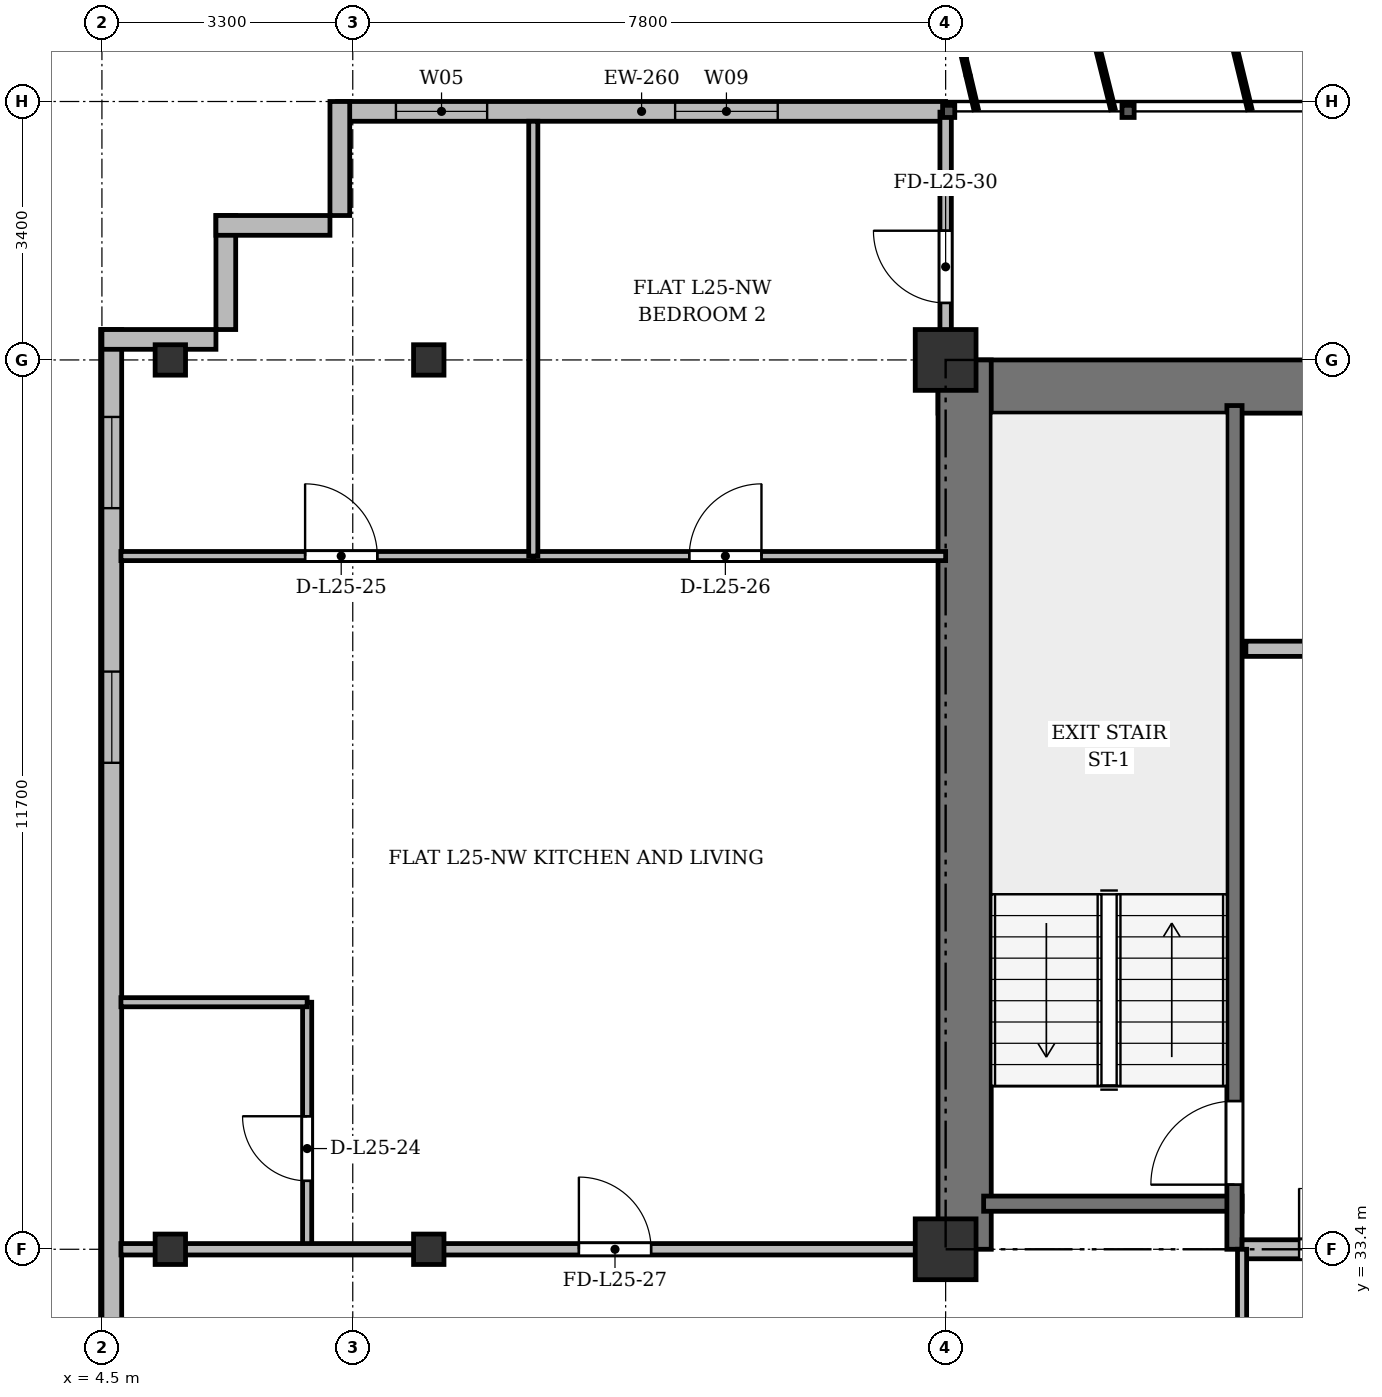
"""IFC4 building model, lengths in metres.
Left out: names, types, materials, properties, quantities, classifications, styles, units other than length and angle.
Written with IfcOpenShell. Run it as: python <this file> out.ifc"""

import sys

from ifc_helpers import new_model, si_unit, direction, frame, frame_2d, origin, origin_2d, place, context, subcontext, project, spatial, rectangle, i_section, extrude, source, transform, mapped, element, fill, save


model = new_model("IFC4")
c1 = context("Model", 3, precision=1e-05, world=origin(), true_north=direction((0.0, 1.0)))
c2 = subcontext(c1, "Body", "Model", "MODEL_VIEW")
j1 = project(units=[si_unit("LENGTHUNIT", "METRE"), si_unit("PLANEANGLEUNIT", "RADIAN")], contexts=[c1])
p1 = place(None, origin())
s1 = spatial("IfcSite", under=j1, at=p1, CompositionType="ELEMENT")
p2 = place(p1, origin())
s2 = spatial("IfcBuilding", under=s1, at=p2, CompositionType="ELEMENT")
p3 = place(p2, frame((0.0, 0.0, 99.7)))
s3 = spatial("IfcBuildingStorey", under=s2, at=p3, CompositionType="ELEMENT", Elevation=99.7)
m1 = source(origin(), c2, "Body", "SweptSolid", [
    extrude(i_section(OverallWidth=0.4, OverallDepth=0.4, WebThickness=0.022, FlangeThickness=0.035, at=origin_2d()), origin(), (0.0, 0.0, 1.0), 3.6),
])
for number, where, z_axis, x_axis in (
    (1, (5.4, 33.4, 0.0), (0.0, 0.0, 1.0), (1.0, 0.0, 0.0)),
    (2, (5.4, 45.1, 0.0), (0.0, 0.0, 1.0), (1.0, 0.0, 0.0)),
    (3, (8.8, 33.4, 0.0), (0.0, 0.0, 1.0), (1.0, 0.0, 0.0)),
    (4, (8.8, 45.1, 0.0), (0.0, 0.0, 1.0), (1.0, 0.0, 0.0)),
):
    element("IfcColumn", number, at=place(p3, frame(where, z_axis=z_axis, x_axis=x_axis)), inside=s3, PredefinedType="COLUMN", context=c2, shape_type="MappedRepresentation", body=[
        mapped(m1, transform((0.0, 0.0, 0.0), x_axis=(1.0, 0.0, 0.0), y_axis=(0.0, 1.0, 0.0), z_axis=(0.0, 0.0, 1.0), scale=1.0)),
    ])
m2 = source(origin(), c2, "Body", "SweptSolid", [
    extrude(rectangle(XDim=0.8, YDim=0.8, at=origin_2d()), origin(), (0.0, 0.0, 1.0), 3.6),
])
for number, where, z_axis, x_axis in (
    (5, (15.6, 33.4, 0.0), (0.0, 0.0, 1.0), (1.0, 0.0, 0.0)),
    (6, (15.6, 45.1, 0.0), (0.0, 0.0, 1.0), (1.0, 0.0, 0.0)),
):
    element("IfcColumn", number, at=place(p3, frame(where, z_axis=z_axis, x_axis=x_axis)), inside=s3, PredefinedType="COLUMN", context=c2, shape_type="MappedRepresentation", body=[
        mapped(m2, transform((0.0, 0.0, 0.0), x_axis=(1.0, 0.0, 0.0), y_axis=(0.0, 1.0, 0.0), z_axis=(0.0, 0.0, 1.0), scale=1.0)),
    ])
p4 = place(p3, frame((7.6, 48.37, 0.0), z_axis=(0.0, 0.0, 1.0), x_axis=(1.0, 0.0, 0.0)))
e7 = element("IfcWall", 7, at=p4, inside=s3, PredefinedType="SOLIDWALL", context=c2, shape_type="SweptSolid", body=[
    extrude(rectangle(XDim=8.0, YDim=0.26, at=frame_2d((4.0, 0.0))), origin(), (0.0, 0.0, 1.0), 3.34),
])
p5 = place(p4, frame((0.768, 0.0, 0.9)))
e8 = element("IfcOpeningElement", 8, at=p5, cuts=e7, PredefinedType="OPENING", context=c2, shape_type="SweptSolid", body=[
    extrude(rectangle(XDim=1.2, YDim=1.65, at=frame_2d((0.6, 0.825))), frame((0.0, 0.14, 0.0), z_axis=(0.0, -1.0, 0.0), x_axis=(1.0, 0.0, 0.0)), (0.0, 0.0, 1.0), 0.28),
])
p6 = place(p4, frame((4.441, 0.0, 0.9)))
e9 = element("IfcOpeningElement", 9, at=p6, cuts=e7, PredefinedType="OPENING", context=c2, shape_type="SweptSolid", body=[
    extrude(rectangle(XDim=1.35, YDim=1.5, at=frame_2d((0.675, 0.75))), frame((0.0, 0.14, 0.0), z_axis=(0.0, -1.0, 0.0), x_axis=(1.0, 0.0, 0.0)), (0.0, 0.0, 1.0), 0.28),
])
p7 = place(p3, frame((4.63, 5.9, 0.0), z_axis=(0.0, 0.0, 1.0), x_axis=(0.0, 1.0, 0.0)))
e10 = element("IfcWall", 10, at=p7, inside=s3, PredefinedType="SOLIDWALL", context=c2, shape_type="SweptSolid", body=[
    extrude(rectangle(XDim=39.6, YDim=0.26, at=frame_2d((19.8, 0.0))), origin(), (0.0, 0.0, 1.0), 3.34),
])
p8 = place(p7, frame((1.45, 0.0, 0.92)))
e11 = element("IfcOpeningElement", 11, at=p8, cuts=e10, PredefinedType="OPENING", context=c2, shape_type="SweptSolid", body=[
    extrude(rectangle(XDim=1.2, YDim=1.65, at=frame_2d((0.6, 0.825))), frame((0.0, 0.14, 0.0), z_axis=(0.0, -1.0, 0.0), x_axis=(1.0, 0.0, 0.0)), (0.0, 0.0, 1.0), 0.28),
])
p9 = place(p7, frame((4.3, 0.0, 0.92)))
e12 = element("IfcOpeningElement", 12, at=p9, cuts=e10, PredefinedType="OPENING", context=c2, shape_type="SweptSolid", body=[
    extrude(rectangle(XDim=2.4, YDim=2.1, at=frame_2d((1.2, 1.05))), frame((0.0, 0.14, 0.0), z_axis=(0.0, -1.0, 0.0), x_axis=(1.0, 0.0, 0.0)), (0.0, 0.0, 1.0), 0.28),
])
p10 = place(p7, frame((8.5, 0.0, 0.92)))
e13 = element("IfcOpeningElement", 13, at=p10, cuts=e10, PredefinedType="OPENING", context=c2, shape_type="SweptSolid", body=[
    extrude(rectangle(XDim=2.4, YDim=2.1, at=frame_2d((1.2, 1.05))), frame((0.0, 0.14, 0.0), z_axis=(0.0, -1.0, 0.0), x_axis=(1.0, 0.0, 0.0)), (0.0, 0.0, 1.0), 0.28),
])
p11 = place(p7, frame((33.9, 0.0, 0.92)))
e14 = element("IfcOpeningElement", 14, at=p11, cuts=e10, PredefinedType="OPENING", context=c2, shape_type="SweptSolid", body=[
    extrude(rectangle(XDim=1.2, YDim=1.65, at=frame_2d((0.6, 0.825))), frame((0.0, 0.14, 0.0), z_axis=(0.0, -1.0, 0.0), x_axis=(1.0, 0.0, 0.0)), (0.0, 0.0, 1.0), 0.28),
])
p12 = place(p7, frame((37.25, 0.0, 0.92)))
e15 = element("IfcOpeningElement", 15, at=p12, cuts=e10, PredefinedType="OPENING", context=c2, shape_type="SweptSolid", body=[
    extrude(rectangle(XDim=1.2, YDim=1.65, at=frame_2d((0.6, 0.825))), frame((0.0, 0.14, 0.0), z_axis=(0.0, -1.0, 0.0), x_axis=(1.0, 0.0, 0.0)), (0.0, 0.0, 1.0), 0.28),
])
p13 = place(p3, frame((4.5, 45.37, 0.0), z_axis=(0.0, 0.0, 1.0), x_axis=(1.0, 0.0, 0.0)))
e16 = element("IfcWall", 16, at=p13, inside=s3, PredefinedType="SOLIDWALL", context=c2, shape_type="SweptSolid", body=[
    extrude(rectangle(XDim=1.5, YDim=0.26, at=frame_2d((0.75, 0.0))), origin(), (0.0, 0.0, 1.0), 2.752),
])
for number, where, z_axis, x_axis in (
    (17, (6.13, 45.5, 0.0), (0.0, 0.0, 1.0), (0.0, 1.0, 0.0)),
    (18, (6.0, 46.87, 0.0), (0.0, 0.0, 1.0), (1.0, 0.0, 0.0)),
    (19, (7.63, 47.0, 0.0), (0.0, 0.0, 1.0), (0.0, 1.0, 0.0)),
):
    element("IfcWall", number, at=place(p3, frame(where, z_axis=z_axis, x_axis=x_axis)), inside=s3, PredefinedType="SOLIDWALL", context=c2, shape_type="SweptSolid", body=[
        extrude(rectangle(XDim=1.5, YDim=0.26, at=frame_2d((0.75, 0.0))), origin(), (0.0, 0.0, 1.0), 3.34),
    ])
p14 = place(p3, frame((15.5, 44.75, 0.0), z_axis=(0.0, 0.0, 1.0), x_axis=(1.0, 0.0, 0.0)))
e20 = element("IfcWall", 20, at=p14, inside=s3, PredefinedType="SHEAR", context=c2, shape_type="SweptSolid", body=[
    extrude(rectangle(XDim=43.4, YDim=0.7, at=frame_2d((21.7, 0.0))), origin(), (0.0, 0.0, 1.0), 3.34),
])
p15 = place(p3, frame((15.85, 33.4, 0.0), z_axis=(0.0, 0.0, 1.0), x_axis=(0.0, 1.0, 0.0)))
e21 = element("IfcWall", 21, at=p15, inside=s3, PredefinedType="SHEAR", context=c2, shape_type="SweptSolid", body=[
    extrude(rectangle(XDim=11.7, YDim=0.7, at=frame_2d((5.85, 0.0))), origin(), (0.0, 0.0, 1.0), 3.34),
])
p16 = place(p3, frame((16.1, 34.0, 0.0), z_axis=(0.0, 0.0, 1.0), x_axis=(1.0, 0.0, 0.0)))
e22 = element("IfcWall", 22, at=p16, inside=s3, PredefinedType="SHEAR", context=c2, shape_type="SweptSolid", body=[
    extrude(rectangle(XDim=3.4, YDim=0.2, at=frame_2d((1.7, 0.0))), origin(), (0.0, 0.0, 1.0), 3.34),
])
p17 = place(p3, frame((19.4, 33.4, 0.0), z_axis=(0.0, 0.0, 1.0), x_axis=(0.0, 1.0, 0.0)))
e23 = element("IfcWall", 23, at=p17, inside=s3, PredefinedType="SHEAR", context=c2, shape_type="SweptSolid", body=[
    extrude(rectangle(XDim=11.1, YDim=0.2, at=frame_2d((5.55, 0.0))), origin(), (0.0, 0.0, 1.0), 3.34),
])
p18 = place(p17, frame((0.85, 0.0, 0.0)))
e24 = element("IfcOpeningElement", 24, at=p18, cuts=e23, PredefinedType="OPENING", context=c2, shape_type="SweptSolid", body=[
    extrude(rectangle(XDim=1.1, YDim=2.15, at=frame_2d((0.55, 1.075))), frame((0.0, 0.11, 0.0), z_axis=(0.0, -1.0, 0.0), x_axis=(1.0, 0.0, 0.0)), (0.0, 0.0, 1.0), 0.22),
])
p19 = place(p3, frame((19.55, 41.3, 0.0), z_axis=(0.0, 0.0, 1.0), x_axis=(1.0, 0.0, 0.0)))
e25 = element("IfcWall", 25, at=p19, inside=s3, PredefinedType="SOLIDWALL", context=c2, shape_type="SweptSolid", body=[
    extrude(rectangle(XDim=6.75, YDim=0.2, at=frame_2d((3.375, 0.0))), origin(), (0.0, 0.0, 1.0), 3.34),
])
p20 = place(p19, frame((1.7, 0.0, 0.0)))
e26 = element("IfcOpeningElement", 26, at=p20, cuts=e25, PredefinedType="OPENING", context=c2, shape_type="SweptSolid", body=[
    extrude(rectangle(XDim=1.1, YDim=2.15, at=frame_2d((0.55, 1.075))), frame((0.0, 0.11, 0.0), z_axis=(0.0, -1.0, 0.0), x_axis=(1.0, 0.0, 0.0)), (0.0, 0.0, 1.0), 0.22),
])
p21 = place(p19, frame((4.4, 0.0, 0.0)))
e27 = element("IfcOpeningElement", 27, at=p21, cuts=e25, PredefinedType="OPENING", context=c2, shape_type="SweptSolid", body=[
    extrude(rectangle(XDim=1.1, YDim=2.15, at=frame_2d((0.55, 1.075))), frame((0.0, 0.11, 0.0), z_axis=(0.0, -1.0, 0.0), x_axis=(1.0, 0.0, 0.0)), (0.0, 0.0, 1.0), 0.22),
])
p22 = place(p3, frame((19.5, 33.4, 0.0), z_axis=(0.0, 0.0, 1.0), x_axis=(1.0, 0.0, 0.0)))
e28 = element("IfcWall", 28, at=p22, inside=s3, PredefinedType="PARTITIONING", context=c2, shape_type="SweptSolid", body=[
    extrude(rectangle(XDim=6.8, YDim=0.25, at=frame_2d((3.4, 0.0))), origin(), (0.0, 0.0, 1.0), 2.752),
])
p23 = place(p22, frame((0.75, 0.0, 0.0)))
e29 = element("IfcOpeningElement", 29, at=p23, cuts=e28, PredefinedType="OPENING", context=c2, shape_type="SweptSolid", body=[
    extrude(rectangle(XDim=1.6, YDim=2.2, at=frame_2d((0.8, 1.1))), frame((0.0, 0.135, 0.0), z_axis=(0.0, -1.0, 0.0), x_axis=(1.0, 0.0, 0.0)), (0.0, 0.0, 1.0), 0.27),
])
p24 = place(p3, frame((19.5, 29.8, 0.0), z_axis=(0.0, 0.0, 1.0), x_axis=(0.0, 1.0, 0.0)))
e30 = element("IfcWall", 30, at=p24, inside=s3, PredefinedType="PARTITIONING", context=c2, shape_type="SweptSolid", body=[
    extrude(rectangle(XDim=3.6, YDim=0.12, at=frame_2d((1.8, 0.0))), origin(), (0.0, 0.0, 1.0), 2.752),
])
p25 = place(p3, frame((7.2, 33.4, 0.0), z_axis=(0.0, 0.0, 1.0), x_axis=(0.0, 1.0, 0.0)))
e31 = element("IfcWall", 31, at=p25, inside=s3, PredefinedType="PARTITIONING", context=c2, shape_type="SweptSolid", body=[
    extrude(rectangle(XDim=3.25, YDim=0.12, at=frame_2d((1.625, 0.0))), origin(), (0.0, 0.0, 1.0), 2.752),
])
p26 = place(p25, frame((0.9, 0.0, 0.0)))
e32 = element("IfcOpeningElement", 32, at=p26, cuts=e31, PredefinedType="OPENING", context=c2, shape_type="SweptSolid", body=[
    extrude(rectangle(XDim=0.85, YDim=2.1, at=frame_2d((0.425, 1.05))), frame((0.0, 0.07, 0.0), z_axis=(0.0, -1.0, 0.0), x_axis=(1.0, 0.0, 0.0)), (0.0, 0.0, 1.0), 0.14),
])
p27 = place(p3, frame((4.75, 36.65, 0.0), z_axis=(0.0, 0.0, 1.0), x_axis=(1.0, 0.0, 0.0)))
e33 = element("IfcWall", 33, at=p27, inside=s3, PredefinedType="PARTITIONING", context=c2, shape_type="SweptSolid", body=[
    extrude(rectangle(XDim=2.45, YDim=0.12, at=frame_2d((1.225, 0.0))), origin(), (0.0, 0.0, 1.0), 2.84),
])
p28 = place(p3, frame((4.75, 42.52, 0.0), z_axis=(0.0, 0.0, 1.0), x_axis=(1.0, 0.0, 0.0)))
e34 = element("IfcWall", 34, at=p28, inside=s3, PredefinedType="PARTITIONING", context=c2, shape_type="SweptSolid", body=[
    extrude(rectangle(XDim=5.425, YDim=0.12, at=frame_2d((2.712, 0.0))), origin(), (0.0, 0.0, 1.0), 2.84),
])
p29 = place(p28, frame((2.423, 0.0, 0.0)))
e35 = element("IfcOpeningElement", 35, at=p29, cuts=e34, PredefinedType="OPENING", context=c2, shape_type="SweptSolid", body=[
    extrude(rectangle(XDim=0.95, YDim=2.15, at=frame_2d((0.475, 1.075))), frame((0.0, 0.07, 0.0), z_axis=(0.0, -1.0, 0.0), x_axis=(1.0, 0.0, 0.0)), (0.0, 0.0, 1.0), 0.14),
])
p30 = place(p3, frame((10.175, 42.52, 0.0), z_axis=(0.0, 0.0, 1.0), x_axis=(1.0, 0.0, 0.0)))
e36 = element("IfcWall", 36, at=p30, inside=s3, PredefinedType="PARTITIONING", context=c2, shape_type="SweptSolid", body=[
    extrude(rectangle(XDim=5.425, YDim=0.12, at=frame_2d((2.712, 0.0))), origin(), (0.0, 0.0, 1.0), 2.84),
])
p31 = place(p30, frame((2.052, 0.0, 0.0)))
e37 = element("IfcOpeningElement", 37, at=p31, cuts=e36, PredefinedType="OPENING", context=c2, shape_type="SweptSolid", body=[
    extrude(rectangle(XDim=0.95, YDim=2.15, at=frame_2d((0.475, 1.075))), frame((0.0, 0.07, 0.0), z_axis=(0.0, -1.0, 0.0), x_axis=(1.0, 0.0, 0.0)), (0.0, 0.0, 1.0), 0.14),
])
p32 = place(p3, frame((10.175, 42.52, 0.0), z_axis=(0.0, 0.0, 1.0), x_axis=(0.0, 1.0, 0.0)))
e38 = element("IfcWall", 38, at=p32, inside=s3, PredefinedType="PARTITIONING", context=c2, shape_type="SweptSolid", body=[
    extrude(rectangle(XDim=5.72, YDim=0.12, at=frame_2d((2.86, 0.0))), origin(), (0.0, 0.0, 1.0), 2.752),
])
p33 = place(p3, frame((4.75, 33.4, 0.0), z_axis=(0.0, 0.0, 1.0), x_axis=(1.0, 0.0, 0.0)))
e39 = element("IfcWall", 39, at=p33, inside=s3, PredefinedType="PARTITIONING", context=c2, shape_type="SweptSolid", body=[
    extrude(rectangle(XDim=10.85, YDim=0.15, at=frame_2d((5.425, 0.0))), origin(), (0.0, 0.0, 1.0), 2.752),
])
p34 = place(p33, frame((6.025, 0.0, 0.0)))
e40 = element("IfcOpeningElement", 40, at=p34, cuts=e39, PredefinedType="OPENING", context=c2, shape_type="SweptSolid", body=[
    extrude(rectangle(XDim=0.95, YDim=2.15, at=frame_2d((0.475, 1.075))), frame((0.0, 0.085, 0.0), z_axis=(0.0, -1.0, 0.0), x_axis=(1.0, 0.0, 0.0)), (0.0, 0.0, 1.0), 0.17),
])
p35 = place(p3, frame((15.6, 44.75, 0.0), z_axis=(0.0, 0.0, 1.0), x_axis=(0.0, 1.0, 0.0)))
e41 = element("IfcWall", 41, at=p35, inside=s3, PredefinedType="PARTITIONING", context=c2, shape_type="SweptSolid", body=[
    extrude(rectangle(XDim=3.61, YDim=0.15, at=frame_2d((1.805, 0.0))), origin(), (0.0, 0.0, 1.0), 2.84),
])
p36 = place(p35, frame((1.1, 0.0, 0.0)))
e42 = element("IfcOpeningElement", 42, at=p36, cuts=e41, PredefinedType="OPENING", context=c2, shape_type="SweptSolid", body=[
    extrude(rectangle(XDim=0.95, YDim=2.15, at=frame_2d((0.475, 1.075))), frame((0.0, 0.085, 0.0), z_axis=(0.0, -1.0, 0.0), x_axis=(1.0, 0.0, 0.0)), (0.0, 0.0, 1.0), 0.17),
])
m3 = source(origin(), c2, "Body", "SweptSolid", [
    extrude(rectangle(XDim=1.2, YDim=1.65, at=frame_2d((0.6, 0.825))), frame((0.0, 0.03, 0.0), z_axis=(0.0, -1.0, 0.0), x_axis=(1.0, 0.0, 0.0)), (0.0, 0.0, 1.0), 0.06),
])
p37 = place(p5, origin())
e43 = element("IfcWindow", 43, at=p37, inside=s3, PartitioningType="SINGLE_PANEL", PredefinedType="WINDOW", context=c2, shape_type="MappedRepresentation", body=[
    mapped(m3, transform((0.0, 0.0, 0.0), x_axis=(1.0, 0.0, 0.0), y_axis=(0.0, 1.0, 0.0), z_axis=(0.0, 0.0, 1.0), scale=1.0)),
])
fill(e8, e43)
m4 = source(origin(), c2, "Body", "SweptSolid", [
    extrude(rectangle(XDim=1.35, YDim=1.5, at=frame_2d((0.675, 0.75))), frame((0.0, 0.03, 0.0), z_axis=(0.0, -1.0, 0.0), x_axis=(1.0, 0.0, 0.0)), (0.0, 0.0, 1.0), 0.06),
])
p38 = place(p6, origin())
e44 = element("IfcWindow", 44, at=p38, inside=s3, PartitioningType="SINGLE_PANEL", PredefinedType="WINDOW", context=c2, shape_type="MappedRepresentation", body=[
    mapped(m4, transform((0.0, 0.0, 0.0), x_axis=(1.0, 0.0, 0.0), y_axis=(0.0, 1.0, 0.0), z_axis=(0.0, 0.0, 1.0), scale=1.0)),
])
fill(e9, e44)
p39 = place(p11, origin())
e45 = element("IfcWindow", 45, at=p39, inside=s3, PartitioningType="SINGLE_PANEL", PredefinedType="WINDOW", context=c2, shape_type="MappedRepresentation", body=[
    mapped(m3, transform((0.0, 0.0, 0.0), x_axis=(1.0, 0.0, 0.0), y_axis=(0.0, 1.0, 0.0), z_axis=(0.0, 0.0, 1.0), scale=1.0)),
])
fill(e14, e45)
p40 = place(p12, origin())
e46 = element("IfcWindow", 46, at=p40, inside=s3, PartitioningType="SINGLE_PANEL", PredefinedType="WINDOW", context=c2, shape_type="MappedRepresentation", body=[
    mapped(m3, transform((0.0, 0.0, 0.0), x_axis=(1.0, 0.0, 0.0), y_axis=(0.0, 1.0, 0.0), z_axis=(0.0, 0.0, 1.0), scale=1.0)),
])
fill(e15, e46)
m5 = source(origin(), c2, "Body", "SweptSolid", [
    extrude(rectangle(XDim=1.1, YDim=2.15, at=frame_2d((0.55, 1.075))), frame((0.0, 0.025, 0.0), z_axis=(0.0, -1.0, 0.0), x_axis=(1.0, 0.0, 0.0)), (0.0, 0.0, 1.0), 0.05),
])
p41 = place(p18, origin())
e47 = element("IfcDoor", 47, at=p41, inside=s3, OperationType="SINGLE_SWING_LEFT", PredefinedType="DOOR", context=c2, shape_type="MappedRepresentation", body=[
    mapped(m5, transform((0.0, 0.0, 0.0), x_axis=(1.0, 0.0, 0.0), y_axis=(0.0, 1.0, 0.0), z_axis=(0.0, 0.0, 1.0), scale=1.0)),
])
fill(e24, e47)
m6 = source(origin(), c2, "Body", "SweptSolid", [
    extrude(rectangle(XDim=1.6, YDim=2.2, at=frame_2d((0.8, 1.1))), frame((0.0, 0.025, 0.0), z_axis=(0.0, -1.0, 0.0), x_axis=(1.0, 0.0, 0.0)), (0.0, 0.0, 1.0), 0.05),
])
p42 = place(p23, origin())
e48 = element("IfcDoor", 48, at=p42, inside=s3, OperationType="DOUBLE_DOOR_SINGLE_SWING", PredefinedType="DOOR", context=c2, shape_type="MappedRepresentation", body=[
    mapped(m6, transform((0.0, 0.0, 0.0), x_axis=(1.0, 0.0, 0.0), y_axis=(0.0, 1.0, 0.0), z_axis=(0.0, 0.0, 1.0), scale=1.0)),
])
fill(e29, e48)
m7 = source(origin(), c2, "Body", "SweptSolid", [
    extrude(rectangle(XDim=0.85, YDim=2.1, at=frame_2d((0.425, 1.05))), frame((0.0, 0.025, 0.0), z_axis=(0.0, -1.0, 0.0), x_axis=(1.0, 0.0, 0.0)), (0.0, 0.0, 1.0), 0.05),
])
p43 = place(p26, origin())
e49 = element("IfcDoor", 49, at=p43, inside=s3, OperationType="SINGLE_SWING_RIGHT", PredefinedType="DOOR", context=c2, shape_type="MappedRepresentation", body=[
    mapped(m7, transform((0.0, 0.0, 0.0), x_axis=(1.0, 0.0, 0.0), y_axis=(0.0, 1.0, 0.0), z_axis=(0.0, 0.0, 1.0), scale=1.0)),
])
fill(e32, e49)
m8 = source(origin(), c2, "Body", "SweptSolid", [
    extrude(rectangle(XDim=0.95, YDim=2.15, at=frame_2d((0.475, 1.075))), frame((0.0, 0.025, 0.0), z_axis=(0.0, -1.0, 0.0), x_axis=(1.0, 0.0, 0.0)), (0.0, 0.0, 1.0), 0.05),
])
p44 = place(p29, origin())
e50 = element("IfcDoor", 50, at=p44, inside=s3, OperationType="SINGLE_SWING_LEFT", PredefinedType="DOOR", context=c2, shape_type="MappedRepresentation", body=[
    mapped(m8, transform((0.0, 0.0, 0.0), x_axis=(1.0, 0.0, 0.0), y_axis=(0.0, 1.0, 0.0), z_axis=(0.0, 0.0, 1.0), scale=1.0)),
])
fill(e35, e50)
p45 = place(p31, origin())
e51 = element("IfcDoor", 51, at=p45, inside=s3, OperationType="SINGLE_SWING_RIGHT", PredefinedType="DOOR", context=c2, shape_type="MappedRepresentation", body=[
    mapped(m8, transform((0.0, 0.0, 0.0), x_axis=(1.0, 0.0, 0.0), y_axis=(0.0, 1.0, 0.0), z_axis=(0.0, 0.0, 1.0), scale=1.0)),
])
fill(e37, e51)
p46 = place(p34, origin())
e52 = element("IfcDoor", 52, at=p46, inside=s3, OperationType="SINGLE_SWING_LEFT", PredefinedType="DOOR", context=c2, shape_type="MappedRepresentation", body=[
    mapped(m8, transform((0.0, 0.0, 0.0), x_axis=(1.0, 0.0, 0.0), y_axis=(0.0, 1.0, 0.0), z_axis=(0.0, 0.0, 1.0), scale=1.0)),
])
fill(e40, e52)
p47 = place(p36, origin())
e53 = element("IfcDoor", 53, at=p47, inside=s3, OperationType="SINGLE_SWING_RIGHT", PredefinedType="DOOR", context=c2, shape_type="MappedRepresentation", body=[
    mapped(m8, transform((0.0, 0.0, 0.0), x_axis=(1.0, 0.0, 0.0), y_axis=(0.0, 1.0, 0.0), z_axis=(0.0, 0.0, 1.0), scale=1.0)),
])
fill(e42, e53)
save(model, sys.argv[1])
